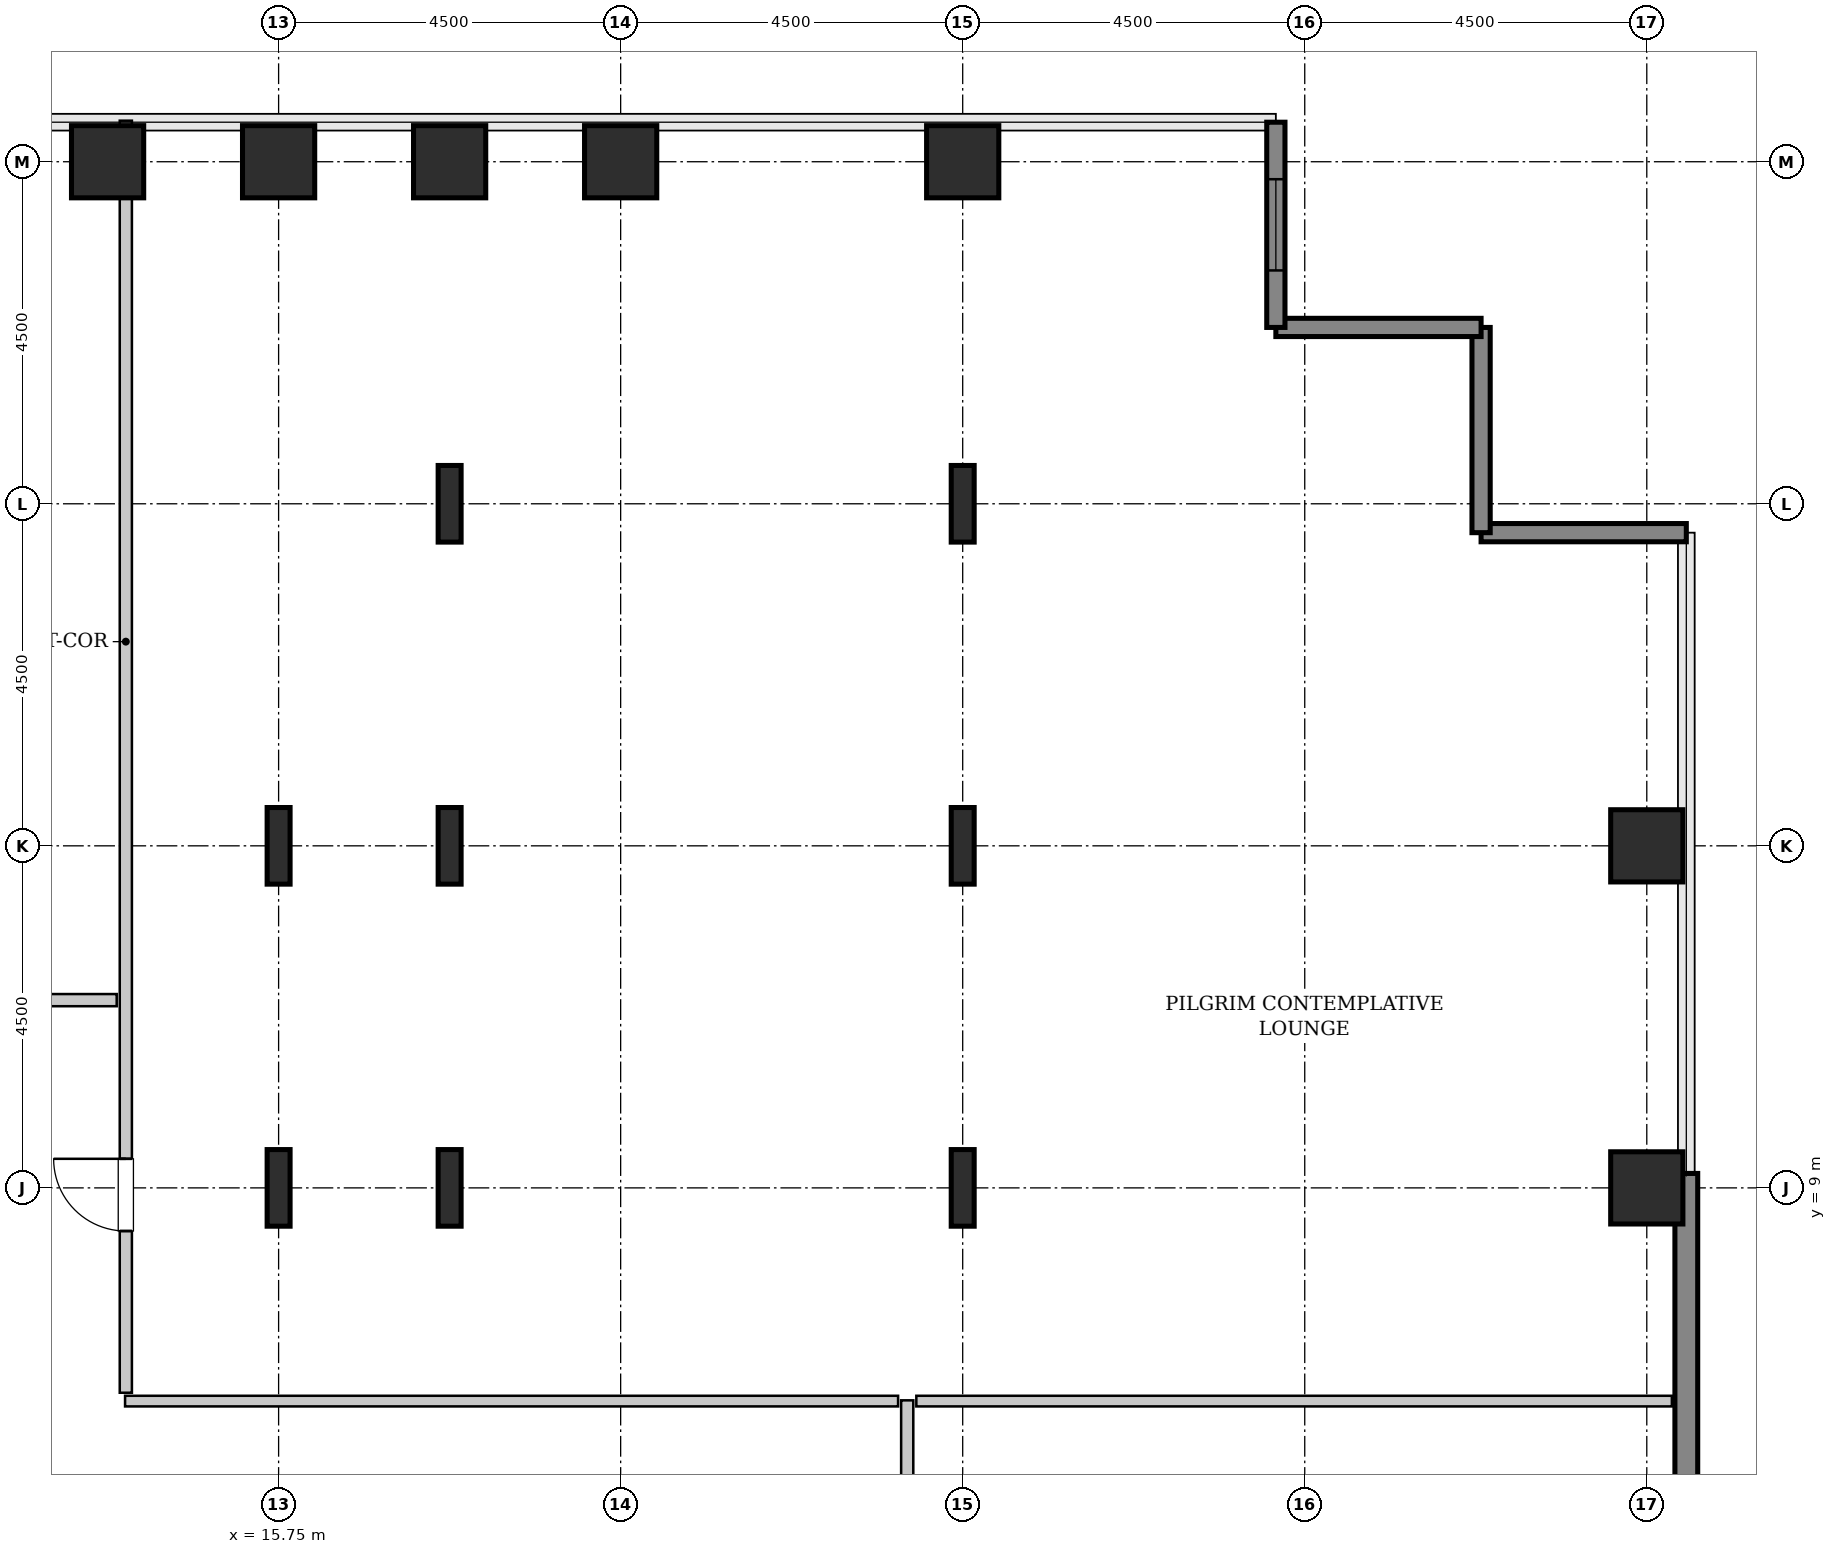
"""IFC4 building model, lengths in metres.
Left out: names, types, materials, properties, quantities, classifications, styles, units other than length and angle.
Written with IfcOpenShell. Run it as: python <this file> out.ifc"""

import sys

from ifc_helpers import new_model, si_unit, direction, frame, frame_2d, origin, origin_2d, place, context, subcontext, project, spatial, rectangle, hollow_rectangle, i_section, extrude, source, transform, mapped, element, fill, save


model = new_model("IFC4")
c1 = context("Model", 3, precision=1e-05, world=origin(), true_north=direction((0.0, 1.0)))
c2 = subcontext(c1, "Body", "Model", "MODEL_VIEW")
j1 = project(units=[si_unit("LENGTHUNIT", "METRE"), si_unit("PLANEANGLEUNIT", "RADIAN")], contexts=[c1])
p1 = place(None, origin())
s1 = spatial("IfcSite", under=j1, at=p1, CompositionType="ELEMENT")
p2 = place(p1, origin())
s2 = spatial("IfcBuilding", under=s1, at=p2, CompositionType="ELEMENT")
p3 = place(p2, frame((0.0, 0.0, 44.4)))
s3 = spatial("IfcBuildingStorey", under=s2, at=p3, CompositionType="ELEMENT", Elevation=44.4)
m1 = source(origin(), c2, "Body", "SweptSolid", [
    extrude(hollow_rectangle(XDim=0.95, YDim=0.95, WallThickness=0.045, InnerFilletRadius=0.045, OuterFilletRadius=0.09, at=origin_2d()), origin(), (0.0, 0.0, 1.0), 3.8),
])
p4 = place(p3, frame((13.5, 22.5, 0.0), z_axis=(0.0, 0.0, 1.0), x_axis=(1.0, 0.0, 0.0)))
e1 = element("IfcColumn", 1, at=p4, inside=s3, PredefinedType="COLUMN", context=c2, shape_type="MappedRepresentation", body=[
    mapped(m1, transform((0.0, 0.0, 0.0), x_axis=(1.0, 0.0, 0.0), y_axis=(0.0, 1.0, 0.0), z_axis=(0.0, 0.0, 1.0), scale=1.0)),
])
m2 = source(origin(), c2, "Body", "SweptSolid", [
    extrude(i_section(OverallWidth=0.302, OverallDepth=1.008, WebThickness=0.021, FlangeThickness=0.04, FilletRadius=0.03, at=origin_2d()), origin(), (0.0, 0.0, 1.0), 3.8),
])
for number, where, z_axis, x_axis in (
    (2, (15.75, 9.0, 0.0), (0.0, 0.0, 1.0), (1.0, 0.0, 0.0)),
    (3, (15.75, 13.5, 0.0), (0.0, 0.0, 1.0), (1.0, 0.0, 0.0)),
):
    element("IfcColumn", number, at=place(p3, frame(where, z_axis=z_axis, x_axis=x_axis)), inside=s3, PredefinedType="COLUMN", context=c2, shape_type="MappedRepresentation", body=[
        mapped(m2, transform((0.0, 0.0, 0.0), x_axis=(1.0, 0.0, 0.0), y_axis=(0.0, 1.0, 0.0), z_axis=(0.0, 0.0, 1.0), scale=1.0)),
    ])
p5 = place(p3, frame((15.75, 22.5, 0.0), z_axis=(0.0, 0.0, 1.0), x_axis=(1.0, 0.0, 0.0)))
e4 = element("IfcColumn", 4, at=p5, inside=s3, PredefinedType="COLUMN", context=c2, shape_type="MappedRepresentation", body=[
    mapped(m1, transform((0.0, 0.0, 0.0), x_axis=(1.0, 0.0, 0.0), y_axis=(0.0, 1.0, 0.0), z_axis=(0.0, 0.0, 1.0), scale=1.0)),
])
for number, where, z_axis, x_axis in (
    (5, (18.0, 9.0, 0.0), (0.0, 0.0, 1.0), (1.0, 0.0, 0.0)),
    (6, (18.0, 13.5, 0.0), (0.0, 0.0, 1.0), (1.0, 0.0, 0.0)),
    (7, (18.0, 18.0, 0.0), (0.0, 0.0, 1.0), (1.0, 0.0, 0.0)),
):
    element("IfcColumn", number, at=place(p3, frame(where, z_axis=z_axis, x_axis=x_axis)), inside=s3, PredefinedType="COLUMN", context=c2, shape_type="MappedRepresentation", body=[
        mapped(m2, transform((0.0, 0.0, 0.0), x_axis=(1.0, 0.0, 0.0), y_axis=(0.0, 1.0, 0.0), z_axis=(0.0, 0.0, 1.0), scale=1.0)),
    ])
for number, where, z_axis, x_axis in (
    (8, (18.0, 22.5, 0.0), (0.0, 0.0, 1.0), (1.0, 0.0, 0.0)),
    (9, (20.25, 22.5, 0.0), (0.0, 0.0, 1.0), (1.0, 0.0, 0.0)),
):
    element("IfcColumn", number, at=place(p3, frame(where, z_axis=z_axis, x_axis=x_axis)), inside=s3, PredefinedType="COLUMN", context=c2, shape_type="MappedRepresentation", body=[
        mapped(m1, transform((0.0, 0.0, 0.0), x_axis=(1.0, 0.0, 0.0), y_axis=(0.0, 1.0, 0.0), z_axis=(0.0, 0.0, 1.0), scale=1.0)),
    ])
for number, where, z_axis, x_axis in (
    (10, (24.75, 9.0, 0.0), (0.0, 0.0, 1.0), (1.0, 0.0, 0.0)),
    (11, (24.75, 13.5, 0.0), (0.0, 0.0, 1.0), (1.0, 0.0, 0.0)),
    (12, (24.75, 18.0, 0.0), (0.0, 0.0, 1.0), (1.0, 0.0, 0.0)),
):
    element("IfcColumn", number, at=place(p3, frame(where, z_axis=z_axis, x_axis=x_axis)), inside=s3, PredefinedType="COLUMN", context=c2, shape_type="MappedRepresentation", body=[
        mapped(m2, transform((0.0, 0.0, 0.0), x_axis=(1.0, 0.0, 0.0), y_axis=(0.0, 1.0, 0.0), z_axis=(0.0, 0.0, 1.0), scale=1.0)),
    ])
for number, where, z_axis, x_axis in (
    (13, (24.75, 22.5, 0.0), (0.0, 0.0, 1.0), (1.0, 0.0, 0.0)),
    (14, (33.75, 9.0, 0.0), (0.0, 0.0, 1.0), (1.0, 0.0, 0.0)),
    (15, (33.75, 13.5, 0.0), (0.0, 0.0, 1.0), (1.0, 0.0, 0.0)),
):
    element("IfcColumn", number, at=place(p3, frame(where, z_axis=z_axis, x_axis=x_axis)), inside=s3, PredefinedType="COLUMN", context=c2, shape_type="MappedRepresentation", body=[
        mapped(m1, transform((0.0, 0.0, 0.0), x_axis=(1.0, 0.0, 0.0), y_axis=(0.0, 1.0, 0.0), z_axis=(0.0, 0.0, 1.0), scale=1.0)),
    ])
m3 = source(origin(), c2, "Body", "SweptSolid", [
    extrude(rectangle(XDim=4.88, YDim=0.3, at=frame_2d((2.44, 0.0))), origin(), (0.0, 0.0, 1.0), 3.55),
])
p6 = place(p3, frame((34.27, 4.31, 0.0), z_axis=(0.0, 0.0, 1.0), x_axis=(0.0, 1.0, 0.0)))
e16 = element("IfcWall", 16, at=p6, inside=s3, PredefinedType="SHEAR", context=c2, shape_type="MappedRepresentation", body=[
    mapped(m3, transform((0.0, 0.0, 0.0), x_axis=(1.0, 0.0, 0.0), y_axis=(0.0, 1.0, 0.0), z_axis=(0.0, 0.0, 1.0), scale=1.0)),
])
m4 = source(origin(), c2, "Body", "SweptSolid", [
    extrude(rectangle(XDim=2.7, YDim=0.24, at=frame_2d((1.35, 0.0))), origin(), (0.0, 0.0, 1.0), 3.55),
])
for number, where, z_axis, x_axis in (
    (17, (34.27, 17.62, 0.0), (0.0, 0.0, 1.0), (-1.0, 0.0, 0.0)),
    (18, (31.57, 17.62, 0.0), (0.0, 0.0, 1.0), (0.0, 1.0, 0.0)),
    (19, (31.57, 20.32, 0.0), (0.0, 0.0, 1.0), (-1.0, 0.0, 0.0)),
):
    element("IfcWall", number, at=place(p3, frame(where, z_axis=z_axis, x_axis=x_axis)), inside=s3, PredefinedType="SHEAR", context=c2, shape_type="MappedRepresentation", body=[
        mapped(m4, transform((0.0, 0.0, 0.0), x_axis=(1.0, 0.0, 0.0), y_axis=(0.0, 1.0, 0.0), z_axis=(0.0, 0.0, 1.0), scale=1.0)),
    ])
p7 = place(p3, frame((28.87, 20.32, 0.0), z_axis=(0.0, 0.0, 1.0), x_axis=(0.0, 1.0, 0.0)))
e20 = element("IfcWall", 20, at=p7, inside=s3, PredefinedType="SHEAR", context=c2, shape_type="MappedRepresentation", body=[
    mapped(m4, transform((0.0, 0.0, 0.0), x_axis=(1.0, 0.0, 0.0), y_axis=(0.0, 1.0, 0.0), z_axis=(0.0, 0.0, 1.0), scale=1.0)),
])
p8 = place(p7, frame((0.75, 0.0, 0.85)))
e21 = element("IfcOpeningElement", 21, at=p8, cuts=e20, PredefinedType="OPENING", context=c2, shape_type="SweptSolid", body=[
    extrude(rectangle(XDim=1.2, YDim=1.8, at=frame_2d((0.6, 0.9))), frame((0.0, 0.13, 0.0), z_axis=(0.0, -1.0, 0.0), x_axis=(1.0, 0.0, 0.0)), (0.0, 0.0, 1.0), 0.26),
])
m5 = source(origin(), c2, "Body", "SweptSolid", [
    extrude(rectangle(XDim=13.3, YDim=0.16, at=frame_2d((6.65, 0.0))), origin(), (0.0, 0.0, 1.0), 3.535),
])
p9 = place(p3, frame((24.02, -7.095, 0.0), z_axis=(0.0, 0.0, 1.0), x_axis=(0.0, 1.0, 0.0)))
e22 = element("IfcWall", 22, at=p9, inside=s3, PredefinedType="PARTITIONING", context=c2, shape_type="MappedRepresentation", body=[
    mapped(m5, transform((0.0, 0.0, 0.0), x_axis=(1.0, 0.0, 0.0), y_axis=(0.0, 1.0, 0.0), z_axis=(0.0, 0.0, 1.0), scale=1.0)),
])
p10 = place(p9, frame((8.87, 0.0, 0.0)))
e23 = element("IfcOpeningElement", 23, at=p10, cuts=e22, PredefinedType="OPENING", context=c2, shape_type="SweptSolid", body=[
    extrude(rectangle(XDim=0.95, YDim=2.1, at=frame_2d((0.475, 1.05))), frame((0.0, 0.09, 0.0), z_axis=(0.0, -1.0, 0.0), x_axis=(1.0, 0.0, 0.0)), (0.0, 0.0, 1.0), 0.18),
])
m6 = source(origin(), c2, "Body", "SweptSolid", [
    extrude(rectangle(XDim=10.17, YDim=0.14, at=frame_2d((5.085, 0.0))), origin(), (0.0, 0.0, 1.0), 3.535),
])
p11 = place(p3, frame((13.73, 6.195, 0.0), z_axis=(0.0, 0.0, 1.0), x_axis=(1.0, 0.0, 0.0)))
e24 = element("IfcWall", 24, at=p11, inside=s3, PredefinedType="PARTITIONING", context=c2, shape_type="MappedRepresentation", body=[
    mapped(m6, transform((0.0, 0.0, 0.0), x_axis=(1.0, 0.0, 0.0), y_axis=(0.0, 1.0, 0.0), z_axis=(0.0, 0.0, 1.0), scale=1.0)),
])
m7 = source(origin(), c2, "Body", "SweptSolid", [
    extrude(rectangle(XDim=9.94, YDim=0.14, at=frame_2d((4.97, 0.0))), origin(), (0.0, 0.0, 1.0), 3.535),
])
p12 = place(p3, frame((24.14, 6.195, 0.0), z_axis=(0.0, 0.0, 1.0), x_axis=(1.0, 0.0, 0.0)))
e25 = element("IfcWall", 25, at=p12, inside=s3, PredefinedType="PARTITIONING", context=c2, shape_type="MappedRepresentation", body=[
    mapped(m7, transform((0.0, 0.0, 0.0), x_axis=(1.0, 0.0, 0.0), y_axis=(0.0, 1.0, 0.0), z_axis=(0.0, 0.0, 1.0), scale=1.0)),
])
m8 = source(origin(), c2, "Body", "SweptSolid", [
    extrude(rectangle(XDim=16.735, YDim=0.16, at=frame_2d((8.368, 0.0))), origin(), (0.0, 0.0, 1.0), 3.535),
])
p13 = place(p3, frame((13.74, 6.305, 0.0), z_axis=(0.0, 0.0, 1.0), x_axis=(0.0, 1.0, 0.0)))
e26 = element("IfcWall", 26, at=p13, inside=s3, PredefinedType="PARTITIONING", context=c2, shape_type="MappedRepresentation", body=[
    mapped(m8, transform((0.0, 0.0, 0.0), x_axis=(1.0, 0.0, 0.0), y_axis=(0.0, 1.0, 0.0), z_axis=(0.0, 0.0, 1.0), scale=1.0)),
])
p14 = place(p13, frame((2.127, 0.0, 0.0)))
e27 = element("IfcOpeningElement", 27, at=p14, cuts=e26, PredefinedType="OPENING", context=c2, shape_type="SweptSolid", body=[
    extrude(rectangle(XDim=0.95, YDim=2.1, at=frame_2d((0.475, 1.05))), frame((0.0, 0.09, 0.0), z_axis=(0.0, -1.0, 0.0), x_axis=(1.0, 0.0, 0.0)), (0.0, 0.0, 1.0), 0.18),
])
m9 = source(origin(), c2, "Body", "SweptSolid", [
    extrude(rectangle(XDim=6.825, YDim=0.16, at=frame_2d((3.413, 0.0))), origin(), (0.0, 0.0, 1.0), 3.535),
])
p15 = place(p3, frame((6.795, 11.47, 0.0), z_axis=(0.0, 0.0, 1.0), x_axis=(1.0, 0.0, 0.0)))
e28 = element("IfcWall", 28, at=p15, inside=s3, PredefinedType="PARTITIONING", context=c2, shape_type="MappedRepresentation", body=[
    mapped(m9, transform((0.0, 0.0, 0.0), x_axis=(1.0, 0.0, 0.0), y_axis=(0.0, 1.0, 0.0), z_axis=(0.0, 0.0, 1.0), scale=1.0)),
])
p16 = place(p15, frame((2.938, 0.0, 0.0)))
e29 = element("IfcOpeningElement", 29, at=p16, cuts=e28, PredefinedType="OPENING", context=c2, shape_type="SweptSolid", body=[
    extrude(rectangle(XDim=0.95, YDim=2.1, at=frame_2d((0.475, 1.05))), frame((0.0, 0.09, 0.0), z_axis=(0.0, -1.0, 0.0), x_axis=(1.0, 0.0, 0.0)), (0.0, 0.0, 1.0), 0.18),
])
m10 = source(origin(), c2, "Body", "SweptSolid", [
    extrude(rectangle(XDim=1.2, YDim=1.8, at=frame_2d((0.6, 0.9))), frame((0.0, 0.03, 0.0), z_axis=(0.0, -1.0, 0.0), x_axis=(1.0, 0.0, 0.0)), (0.0, 0.0, 1.0), 0.06),
])
p17 = place(p8, origin())
e30 = element("IfcWindow", 30, at=p17, inside=s3, PartitioningType="SINGLE_PANEL", PredefinedType="WINDOW", context=c2, shape_type="MappedRepresentation", body=[
    mapped(m10, transform((0.0, 0.0, 0.0), x_axis=(1.0, 0.0, 0.0), y_axis=(0.0, 1.0, 0.0), z_axis=(0.0, 0.0, 1.0), scale=1.0)),
])
fill(e21, e30)
m11 = source(origin(), c2, "Body", "SweptSolid", [
    extrude(rectangle(XDim=0.95, YDim=2.1, at=frame_2d((0.475, 1.05))), frame((0.0, 0.025, 0.0), z_axis=(0.0, -1.0, 0.0), x_axis=(1.0, 0.0, 0.0)), (0.0, 0.0, 1.0), 0.05),
])
p18 = place(p14, origin())
e31 = element("IfcDoor", 31, at=p18, inside=s3, OperationType="SINGLE_SWING_RIGHT", PredefinedType="DOOR", context=c2, shape_type="MappedRepresentation", body=[
    mapped(m11, transform((0.0, 0.0, 0.0), x_axis=(1.0, 0.0, 0.0), y_axis=(0.0, 1.0, 0.0), z_axis=(0.0, 0.0, 1.0), scale=1.0)),
])
fill(e27, e31)
save(model, sys.argv[1])
